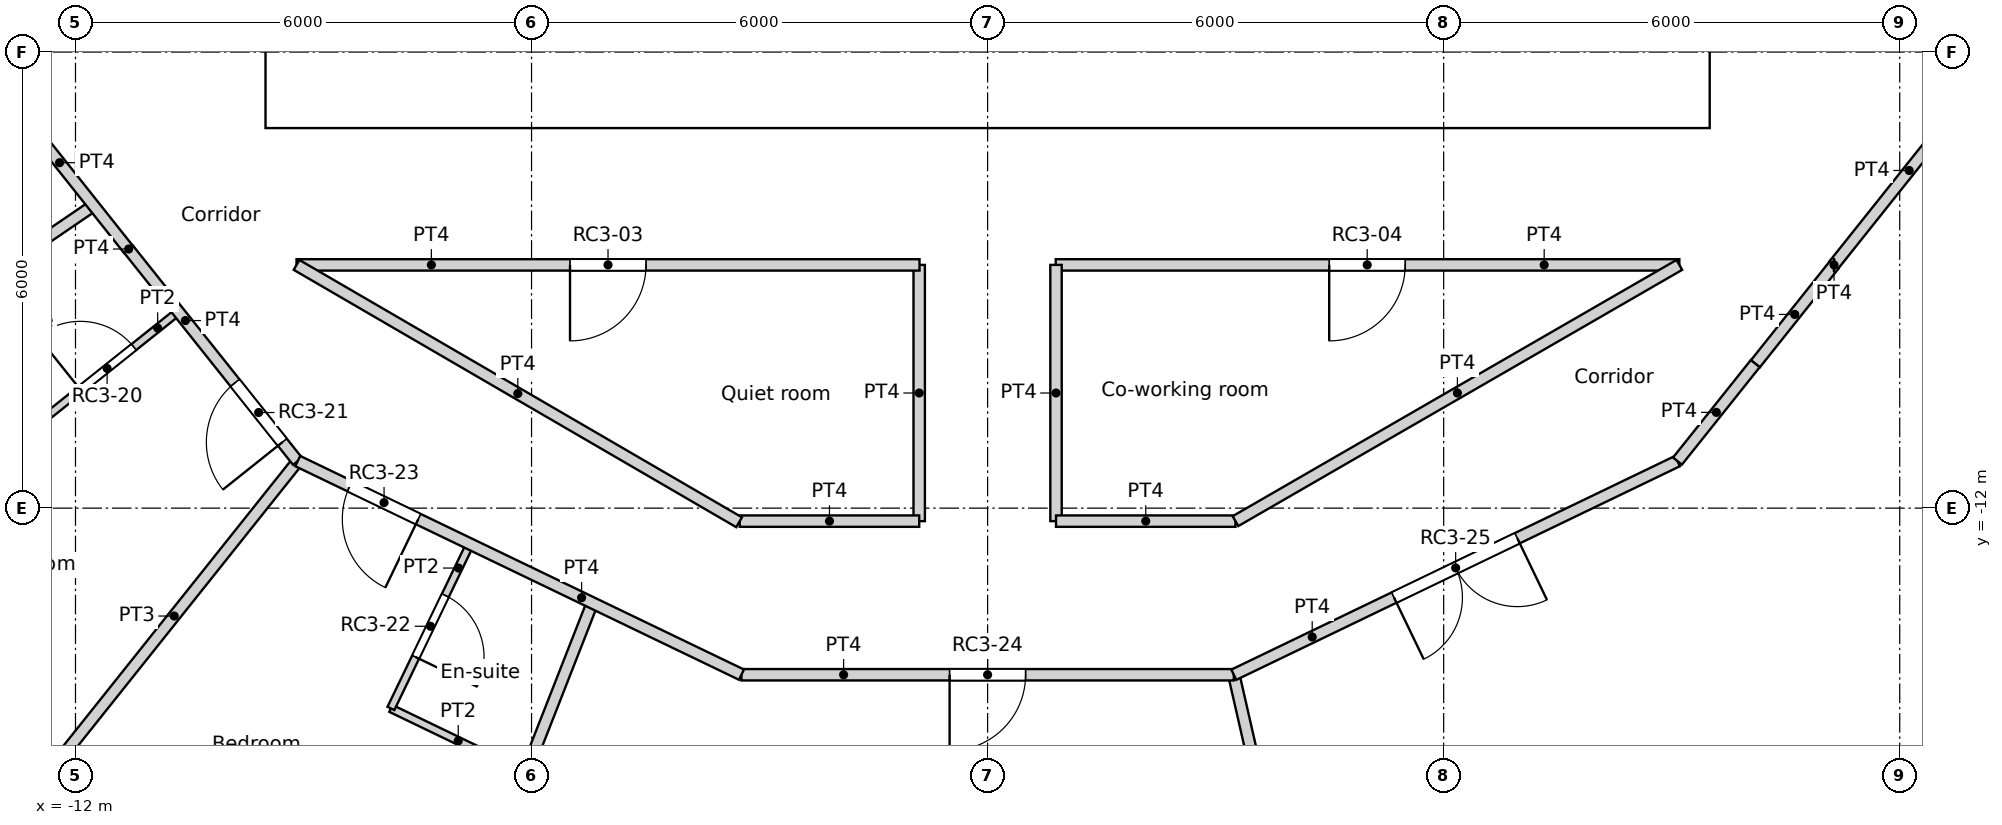
"""IFC4 building model, lengths in metres.
Left out: names, types, materials, properties, quantities, classifications, styles, units other than length and angle.
Written with IfcOpenShell. Run it as: python <this file> out.ifc"""

import sys

from ifc_helpers import new_model, si_unit, direction, frame, frame_2d, origin, origin_2d, place, context, subcontext, project, spatial, rectangle, circle, extrude, element, fill, save


model = new_model("IFC4")
c1 = context("Model", 3, precision=1e-05, world=origin(), true_north=direction((0.0, 1.0)))
c2 = subcontext(c1, "Body", "Model", "MODEL_VIEW")
j1 = project(units=[si_unit("LENGTHUNIT", "METRE"), si_unit("PLANEANGLEUNIT", "RADIAN")], contexts=[c1])
p1 = place(None, origin())
s1 = spatial("IfcSite", under=j1, at=p1, CompositionType="ELEMENT")
p2 = place(p1, origin())
s2 = spatial("IfcBuilding", under=s1, at=p2, CompositionType="ELEMENT")
p3 = place(p2, frame((0.0, 0.0, 252.6)))
s3 = spatial("IfcBuildingStorey", under=s2, at=p3, CompositionType="ELEMENT", Elevation=252.6)
p4 = place(p3, frame((11.735, -14.716, 0.0), z_axis=(0.0, 0.0, 1.0), x_axis=(1.0, 0.0, 0.0)))
e1 = element("IfcColumn", 1, at=p4, inside=s3, PredefinedType="COLUMN", context=c2, shape_type="SweptSolid", body=[
    extrude(circle(Radius=0.55, at=origin_2d()), origin(), (0.0, 0.0, 1.0), 3.6),
])
p5 = place(p3, frame((-9.5, -6.7, 0.0), z_axis=(0.0, 0.0, 1.0), x_axis=(1.0, 0.0, 0.0)))
e2 = element("IfcWall", 2, at=p5, inside=s3, PredefinedType="SOLIDWALL", context=c2, shape_type="SweptSolid", body=[
    extrude(rectangle(XDim=19.0, YDim=0.6, at=frame_2d((9.5, 0.0))), origin(), (0.0, 0.0, 1.0), 3.6),
])
p6 = place(p5, frame((10.4, 0.0, 0.0)))
e3 = element("IfcOpeningElement", 3, at=p6, cuts=e2, PredefinedType="OPENING", context=c2, shape_type="SweptSolid", body=[
    extrude(rectangle(XDim=1.0, YDim=2.1, at=frame_2d((0.5, 1.05))), frame((0.0, 0.3, 0.0), z_axis=(0.0, -1.0, 0.0), x_axis=(1.0, 0.0, 0.0)), (0.0, 0.0, 1.0), 0.6),
])
p7 = place(p5, frame((5.35, 0.0, 0.0)))
e4 = element("IfcOpeningElement", 4, at=p7, cuts=e2, PredefinedType="OPENING", context=c2, shape_type="SweptSolid", body=[
    extrude(rectangle(XDim=1.7, YDim=2.1, at=frame_2d((0.85, 1.05))), frame((0.0, 0.3, 0.0), z_axis=(0.0, -1.0, 0.0), x_axis=(1.0, 0.0, 0.0)), (0.0, 0.0, 1.0), 0.6),
])
p8 = place(p5, frame((11.95, 0.0, 0.0)))
e5 = element("IfcOpeningElement", 5, at=p8, cuts=e2, PredefinedType="OPENING", context=c2, shape_type="SweptSolid", body=[
    extrude(rectangle(XDim=1.7, YDim=2.1, at=frame_2d((0.85, 1.05))), frame((0.0, 0.3, 0.0), z_axis=(0.0, -1.0, 0.0), x_axis=(1.0, 0.0, 0.0)), (0.0, 0.0, 1.0), 0.6),
])
p9 = place(p3, frame((-9.2, -6.4, 0.0), z_axis=(0.0, 0.0, 1.0), x_axis=(0.0, 1.0, 0.0)))
e6 = element("IfcWall", 6, at=p9, inside=s3, PredefinedType="SOLIDWALL", context=c2, shape_type="SweptSolid", body=[
    extrude(rectangle(XDim=12.8, YDim=0.6, at=frame_2d((6.4, 0.0))), origin(), (0.0, 0.0, 1.0), 3.6),
])
p10 = place(p3, frame((9.2, -6.4, 0.0), z_axis=(0.0, 0.0, 1.0), x_axis=(0.0, 1.0, 0.0)))
e7 = element("IfcWall", 7, at=p10, inside=s3, PredefinedType="SOLIDWALL", context=c2, shape_type="SweptSolid", body=[
    extrude(rectangle(XDim=12.8, YDim=0.6, at=frame_2d((6.4, 0.0))), origin(), (0.0, 0.0, 1.0), 3.6),
])
p11 = place(p10, frame((6.4, 0.0, 0.0)))
e8 = element("IfcOpeningElement", 8, at=p11, cuts=e7, PredefinedType="OPENING", context=c2, shape_type="SweptSolid", body=[
    extrude(rectangle(XDim=1.8, YDim=2.1, at=frame_2d((0.9, 1.05))), frame((0.0, 0.3, 0.0), z_axis=(0.0, -1.0, 0.0), x_axis=(1.0, 0.0, 0.0)), (0.0, 0.0, 1.0), 0.6),
])
for number, where, z_axis, x_axis in (
    (9, (-2.25, -6.4, 0.0), (0.0, 0.0, 1.0), (0.0, 1.0, 0.0)),
    (10, (0.55, -6.4, 0.0), (0.0, 0.0, 1.0), (0.0, 1.0, 0.0)),
    (11, (2.25, -6.4, 0.0), (0.0, 0.0, 1.0), (0.0, 1.0, 0.0)),
):
    element("IfcWall", number, at=place(p3, frame(where, z_axis=z_axis, x_axis=x_axis)), inside=s3, PredefinedType="SOLIDWALL", context=c2, shape_type="SweptSolid", body=[
        extrude(rectangle(XDim=3.15, YDim=0.3, at=frame_2d((1.575, 0.0))), origin(), (0.0, 0.0, 1.0), 3.25),
    ])
p12 = place(p3, frame((-9.092, -8.8, 0.0), z_axis=(0.0, 0.0, 1.0), x_axis=(1.0, 0.0, 0.0)))
e12 = element("IfcWall", 12, at=p12, inside=s3, PredefinedType="PARTITIONING", context=c2, shape_type="SweptSolid", body=[
    extrude(rectangle(XDim=8.196, YDim=0.15, at=frame_2d((4.098, 0.0))), origin(), (0.0, 0.0, 1.0), 3.25),
])
p13 = place(p12, frame((3.598, 0.0, 0.0)))
e13 = element("IfcOpeningElement", 13, at=p13, cuts=e12, PredefinedType="OPENING", context=c2, shape_type="SweptSolid", body=[
    extrude(rectangle(XDim=1.0, YDim=2.04, at=frame_2d((0.5, 1.02))), frame((0.0, 0.075, 0.0), z_axis=(0.0, -1.0, 0.0), x_axis=(1.0, 0.0, 0.0)), (0.0, 0.0, 1.0), 0.15),
])
p14 = place(p3, frame((-9.092, -8.8, 0.0), z_axis=(0.0, 0.0, 1.0), x_axis=(0.864470922103, -0.502682827277, 0.0)))
e14 = element("IfcWall", 14, at=p14, inside=s3, PredefinedType="PARTITIONING", context=c2, shape_type="SweptSolid", body=[
    extrude(rectangle(XDim=6.735, YDim=0.15, at=frame_2d((3.368, 0.0))), origin(), (0.0, 0.0, 1.0), 3.25),
])
p15 = place(p3, frame((0.896, -8.8, 0.0), z_axis=(0.0, 0.0, 1.0), x_axis=(1.0, 0.0, 0.0)))
e15 = element("IfcWall", 15, at=p15, inside=s3, PredefinedType="PARTITIONING", context=c2, shape_type="SweptSolid", body=[
    extrude(rectangle(XDim=8.205, YDim=0.15, at=frame_2d((4.102, 0.0))), origin(), (0.0, 0.0, 1.0), 3.25),
])
p16 = place(p15, frame((3.598, 0.0, 0.0)))
e16 = element("IfcOpeningElement", 16, at=p16, cuts=e15, PredefinedType="OPENING", context=c2, shape_type="SweptSolid", body=[
    extrude(rectangle(XDim=1.0, YDim=2.04, at=frame_2d((0.5, 1.02))), frame((0.0, 0.075, 0.0), z_axis=(0.0, -1.0, 0.0), x_axis=(1.0, 0.0, 0.0)), (0.0, 0.0, 1.0), 0.15),
])
p17 = place(p3, frame((-11.3, -8.596, 0.0), z_axis=(0.0, 0.0, 1.0), x_axis=(0.623165080354, -0.782090328944, 0.0)))
e17 = element("IfcWall", 17, at=p17, inside=s3, PredefinedType="PARTITIONING", context=c2, shape_type="SweptSolid", body=[
    extrude(rectangle(XDim=3.564, YDim=0.15, at=frame_2d((1.782, 0.0))), origin(), (0.0, 0.0, 1.0), 3.25),
])
p18 = place(p17, frame((2.244, 0.0, 0.0)))
e18 = element("IfcOpeningElement", 18, at=p18, cuts=e17, PredefinedType="OPENING", context=c2, shape_type="SweptSolid", body=[
    extrude(rectangle(XDim=1.0, YDim=2.1, at=frame_2d((0.5, 1.05))), frame((0.0, 0.075, 0.0), z_axis=(0.0, -1.0, 0.0), x_axis=(1.0, 0.0, 0.0)), (0.0, 0.0, 1.0), 0.15),
])
p19 = place(p3, frame((-11.3, -8.596, 0.0), z_axis=(0.0, 0.0, 1.0), x_axis=(0.0, 1.0, 0.0)))
e19 = element("IfcWall", 19, at=p19, inside=s3, PredefinedType="PARTITIONING", context=c2, shape_type="SweptSolid", body=[
    extrude(rectangle(XDim=0.01, YDim=0.15, at=frame_2d((0.005, 0.0))), origin(), (0.0, 0.0, 1.0), 3.25),
])
p20 = place(p3, frame((11.137, -8.8, 0.0), z_axis=(0.0, 0.0, 1.0), x_axis=(-1.0, 0.0, 0.0)))
e20 = element("IfcWall", 20, at=p20, inside=s3, PredefinedType="PARTITIONING", context=c2, shape_type="SweptSolid", body=[
    extrude(rectangle(XDim=0.003, YDim=0.15, at=frame_2d((0.001, 0.0))), origin(), (0.0, 0.0, 1.0), 3.25),
])
p21 = place(p3, frame((10.101, -10.101, 0.0), z_axis=(0.0, 0.0, 1.0), x_axis=(0.623098344652, 0.782143498913, 0.0)))
e21 = element("IfcWall", 21, at=p21, inside=s3, PredefinedType="PARTITIONING", context=c2, shape_type="SweptSolid", body=[
    extrude(rectangle(XDim=1.661, YDim=0.15, at=frame_2d((0.831, 0.0))), origin(), (0.0, 0.0, 1.0), 3.25),
])
p22 = place(p3, frame((11.134, -8.8, 0.0), z_axis=(0.0, 0.0, 1.0), x_axis=(0.623476099415, 0.781842409606, 0.0)))
e22 = element("IfcWall", 22, at=p22, inside=s3, PredefinedType="PARTITIONING", context=c2, shape_type="SweptSolid", body=[
    extrude(rectangle(XDim=3.177, YDim=0.15, at=frame_2d((1.589, 0.0))), origin(), (0.0, 0.0, 1.0), 3.25),
])
p23 = place(p3, frame((-13.115, -6.316, 0.0), z_axis=(0.0, 0.0, 1.0), x_axis=(0.622042479172, -0.782983495423, 0.0)))
e23 = element("IfcWall", 23, at=p23, inside=s3, PredefinedType="PARTITIONING", context=c2, shape_type="SweptSolid", body=[
    extrude(rectangle(XDim=2.911, YDim=0.15, at=frame_2d((1.456, 0.0))), origin(), (0.0, 0.0, 1.0), 3.25),
])
p24 = place(p3, frame((-3.261, -12.171, 0.0), z_axis=(0.0, 0.0, 1.0), x_axis=(1.0, 0.0, 0.0)))
e24 = element("IfcWall", 24, at=p24, inside=s3, PredefinedType="PARTITIONING", context=c2, shape_type="SweptSolid", body=[
    extrude(rectangle(XDim=2.361, YDim=0.15, at=frame_2d((1.181, 0.0))), origin(), (0.0, 0.0, 1.0), 3.25),
])
for number, where, z_axis, x_axis in (
    (25, (-0.9, -12.171, 0.0), (0.0, 0.0, 1.0), (0.0, 1.0, 0.0)),
    (26, (0.9, -12.171, 0.0), (0.0, 0.0, 1.0), (0.0, 1.0, 0.0)),
):
    element("IfcWall", number, at=place(p3, frame(where, z_axis=z_axis, x_axis=x_axis)), inside=s3, PredefinedType="PARTITIONING", context=c2, shape_type="SweptSolid", body=[
        extrude(rectangle(XDim=3.371, YDim=0.15, at=frame_2d((1.686, 0.0))), origin(), (0.0, 0.0, 1.0), 3.25),
    ])
p25 = place(p3, frame((0.9, -12.171, 0.0), z_axis=(0.0, 0.0, 1.0), x_axis=(1.0, 0.0, 0.0)))
e27 = element("IfcWall", 27, at=p25, inside=s3, PredefinedType="PARTITIONING", context=c2, shape_type="SweptSolid", body=[
    extrude(rectangle(XDim=2.361, YDim=0.15, at=frame_2d((1.181, 0.0))), origin(), (0.0, 0.0, 1.0), 3.25),
])
p26 = place(p3, frame((3.261, -12.171, 0.0), z_axis=(0.0, 0.0, 1.0), x_axis=(0.866066809554, 0.499928276245, 0.0)))
e28 = element("IfcWall", 28, at=p26, inside=s3, PredefinedType="PARTITIONING", context=c2, shape_type="SweptSolid", body=[
    extrude(rectangle(XDim=6.743, YDim=0.15, at=frame_2d((3.371, 0.0))), origin(), (0.0, 0.0, 1.0), 3.25),
])
p27 = place(p3, frame((-9.076, -11.381, 0.0), z_axis=(0.0, 0.0, 1.0), x_axis=(0.901070942113, -0.433671716024, 0.0)))
e29 = element("IfcWall", 29, at=p27, inside=s3, PredefinedType="PARTITIONING", context=c2, shape_type="SweptSolid", body=[
    extrude(rectangle(XDim=6.479, YDim=0.15, at=frame_2d((3.239, 0.0))), origin(), (0.0, 0.0, 1.0), 3.25),
])
p28 = place(p27, frame((0.76, 0.0, 0.0)))
e30 = element("IfcOpeningElement", 30, at=p28, cuts=e29, PredefinedType="OPENING", context=c2, shape_type="SweptSolid", body=[
    extrude(rectangle(XDim=1.0, YDim=2.1, at=frame_2d((0.5, 1.05))), frame((0.0, 0.075, 0.0), z_axis=(0.0, -1.0, 0.0), x_axis=(1.0, 0.0, 0.0)), (0.0, 0.0, 1.0), 0.15),
])
p29 = place(p3, frame((-3.239, -14.192, 0.0), z_axis=(0.0, 0.0, 1.0), x_axis=(1.0, 0.0, 0.0)))
e31 = element("IfcWall", 31, at=p29, inside=s3, PredefinedType="PARTITIONING", context=c2, shape_type="SweptSolid", body=[
    extrude(rectangle(XDim=6.478, YDim=0.15, at=frame_2d((3.239, 0.0))), origin(), (0.0, 0.0, 1.0), 3.25),
])
p30 = place(p29, frame((2.739, 0.0, 0.0)))
e32 = element("IfcOpeningElement", 32, at=p30, cuts=e31, PredefinedType="OPENING", context=c2, shape_type="SweptSolid", body=[
    extrude(rectangle(XDim=1.0, YDim=2.04, at=frame_2d((0.5, 1.02))), frame((0.0, 0.075, 0.0), z_axis=(0.0, -1.0, 0.0), x_axis=(1.0, 0.0, 0.0)), (0.0, 0.0, 1.0), 0.15),
])
p31 = place(p3, frame((9.076, -11.381, 0.0), z_axis=(0.0, 0.0, 1.0), x_axis=(0.623805208652, 0.781579849829, 0.0)))
e33 = element("IfcWall", 33, at=p31, inside=s3, PredefinedType="PARTITIONING", context=c2, shape_type="SweptSolid", body=[
    extrude(rectangle(XDim=1.64, YDim=0.15, at=frame_2d((0.82, 0.0))), origin(), (0.0, 0.0, 1.0), 3.25),
])
p32 = place(p3, frame((3.239, -14.192, 0.0), z_axis=(0.0, 0.0, 1.0), x_axis=(0.900976027191, 0.433868872388, 0.0)))
e34 = element("IfcWall", 34, at=p32, inside=s3, PredefinedType="PARTITIONING", context=c2, shape_type="SweptSolid", body=[
    extrude(rectangle(XDim=6.479, YDim=0.15, at=frame_2d((3.239, 0.0))), origin(), (0.0, 0.0, 1.0), 3.25),
])
p33 = place(p32, frame((2.34, 0.0, 0.0)))
e35 = element("IfcOpeningElement", 35, at=p33, cuts=e34, PredefinedType="OPENING", context=c2, shape_type="SweptSolid", body=[
    extrude(rectangle(XDim=1.8, YDim=2.1, at=frame_2d((0.9, 1.05))), frame((0.0, 0.075, 0.0), z_axis=(0.0, -1.0, 0.0), x_axis=(1.0, 0.0, 0.0)), (0.0, 0.0, 1.0), 0.15),
])
p34 = place(p3, frame((-13.75, -9.375, 0.0), z_axis=(0.0, 0.0, 1.0), x_axis=(0.826143746222, 0.563459413426, 0.0)))
e36 = element("IfcWall", 36, at=p34, inside=s3, PredefinedType="PARTITIONING", context=c2, shape_type="SweptSolid", body=[
    extrude(rectangle(XDim=2.41, YDim=0.15, at=frame_2d((1.205, 0.0))), origin(), (0.0, 0.0, 1.0), 3.25),
])
p35 = place(p3, frame((-12.522, -10.91, 0.0), z_axis=(0.0, 0.0, 1.0), x_axis=(0.781830263661, 0.623491330191, 0.0)))
e37 = element("IfcWall", 37, at=p35, inside=s3, PredefinedType="PARTITIONING", context=c2, shape_type="SweptSolid", body=[
    extrude(rectangle(XDim=2.401, YDim=0.1, at=frame_2d((1.2, 0.0))), origin(), (0.0, 0.0, 1.0), 3.25),
])
p36 = place(p35, frame((0.75, 0.0, 0.0)))
e38 = element("IfcOpeningElement", 38, at=p36, cuts=e37, PredefinedType="OPENING", context=c2, shape_type="SweptSolid", body=[
    extrude(rectangle(XDim=0.9, YDim=2.04, at=frame_2d((0.45, 1.02))), frame((0.0, 0.05, 0.0), z_axis=(0.0, -1.0, 0.0), x_axis=(1.0, 0.0, 0.0)), (0.0, 0.0, 1.0), 0.1),
])
p37 = place(p3, frame((-12.327, -15.458, 0.0), z_axis=(0.0, 0.0, 1.0), x_axis=(0.623460949534, 0.781854490558, 0.0)))
e39 = element("IfcWall", 39, at=p37, inside=s3, PredefinedType="PARTITIONING", context=c2, shape_type="SweptSolid", body=[
    extrude(rectangle(XDim=5.214, YDim=0.15, at=frame_2d((2.607, 0.0))), origin(), (0.0, 0.0, 1.0), 3.25),
])
p38 = place(p3, frame((-7.85, -14.635, 0.0), z_axis=(0.0, 0.0, 1.0), x_axis=(0.433815618773, 0.901001669759, 0.0)))
e40 = element("IfcWall", 40, at=p38, inside=s3, PredefinedType="PARTITIONING", context=c2, shape_type="SweptSolid", body=[
    extrude(rectangle(XDim=2.4, YDim=0.1, at=frame_2d((1.2, 0.0))), origin(), (0.0, 0.0, 1.0), 3.25),
])
p39 = place(p38, frame((0.75, 0.0, 0.0)))
e41 = element("IfcOpeningElement", 41, at=p39, cuts=e40, PredefinedType="OPENING", context=c2, shape_type="SweptSolid", body=[
    extrude(rectangle(XDim=0.9, YDim=2.04, at=frame_2d((0.45, 1.02))), frame((0.0, 0.05, 0.0), z_axis=(0.0, -1.0, 0.0), x_axis=(1.0, 0.0, 0.0)), (0.0, 0.0, 1.0), 0.1),
])
p40 = place(p3, frame((-7.85, -14.635, 0.0), z_axis=(0.0, 0.0, 1.0), x_axis=(0.900936932599, -0.433950047216, 0.0)))
e42 = element("IfcWall", 42, at=p40, inside=s3, PredefinedType="PARTITIONING", context=c2, shape_type="SweptSolid", body=[
    extrude(rectangle(XDim=1.966, YDim=0.1, at=frame_2d((0.983, 0.0))), origin(), (0.0, 0.0, 1.0), 3.25),
])
p41 = place(p3, frame((-7.223, -18.405, 0.0), z_axis=(0.0, 0.0, 1.0), x_axis=(0.36511374114, 0.930962918719, 0.0)))
e43 = element("IfcWall", 43, at=p41, inside=s3, PredefinedType="PARTITIONING", context=c2, shape_type="SweptSolid", body=[
    extrude(rectangle(XDim=5.54, YDim=0.15, at=frame_2d((2.77, 0.0))), origin(), (0.0, 0.0, 1.0), 3.25),
])
p42 = place(p3, frame((3.239, -14.192, 0.0), z_axis=(0.0, 0.0, 1.0), x_axis=(0.222612505682, -0.974907007008, 0.0)))
e44 = element("IfcWall", 44, at=p42, inside=s3, PredefinedType="PARTITIONING", context=c2, shape_type="SweptSolid", body=[
    extrude(rectangle(XDim=5.215, YDim=0.15, at=frame_2d((2.607, 0.0))), origin(), (0.0, 0.0, 1.0), 3.25),
])
p43 = place(p6, origin())
e45 = element("IfcDoor", 45, at=p43, inside=s3, OperationType="SINGLE_SWING_LEFT", PredefinedType="DOOR", context=c2, shape_type="SweptSolid", body=[
    extrude(rectangle(XDim=1.0, YDim=2.1, at=frame_2d((0.5, 1.05))), frame((0.0, 0.025, 0.0), z_axis=(0.0, -1.0, 0.0), x_axis=(1.0, 0.0, 0.0)), (0.0, 0.0, 1.0), 0.05),
])
fill(e3, e45)
p44 = place(p7, origin())
e46 = element("IfcDoor", 46, at=p44, inside=s3, OperationType="DOUBLE_DOOR_SINGLE_SWING", PredefinedType="DOOR", context=c2, shape_type="SweptSolid", body=[
    extrude(rectangle(XDim=1.7, YDim=2.1, at=frame_2d((0.85, 1.05))), frame((0.0, 0.025, 0.0), z_axis=(0.0, -1.0, 0.0), x_axis=(1.0, 0.0, 0.0)), (0.0, 0.0, 1.0), 0.05),
])
fill(e4, e46)
p45 = place(p8, origin())
e47 = element("IfcDoor", 47, at=p45, inside=s3, OperationType="DOUBLE_DOOR_SINGLE_SWING", PredefinedType="DOOR", context=c2, shape_type="SweptSolid", body=[
    extrude(rectangle(XDim=1.7, YDim=2.1, at=frame_2d((0.85, 1.05))), frame((0.0, 0.025, 0.0), z_axis=(0.0, -1.0, 0.0), x_axis=(1.0, 0.0, 0.0)), (0.0, 0.0, 1.0), 0.05),
])
fill(e5, e47)
p46 = place(p13, origin())
e48 = element("IfcDoor", 48, at=p46, inside=s3, OperationType="SINGLE_SWING_RIGHT", PredefinedType="DOOR", context=c2, shape_type="SweptSolid", body=[
    extrude(rectangle(XDim=1.0, YDim=2.04, at=frame_2d((0.5, 1.02))), frame((0.0, 0.025, 0.0), z_axis=(0.0, -1.0, 0.0), x_axis=(1.0, 0.0, 0.0)), (0.0, 0.0, 1.0), 0.05),
])
fill(e13, e48)
p47 = place(p16, origin())
e49 = element("IfcDoor", 49, at=p47, inside=s3, OperationType="SINGLE_SWING_RIGHT", PredefinedType="DOOR", context=c2, shape_type="SweptSolid", body=[
    extrude(rectangle(XDim=1.0, YDim=2.04, at=frame_2d((0.5, 1.02))), frame((0.0, 0.025, 0.0), z_axis=(0.0, -1.0, 0.0), x_axis=(1.0, 0.0, 0.0)), (0.0, 0.0, 1.0), 0.05),
])
fill(e16, e49)
p48 = place(p36, origin())
e50 = element("IfcDoor", 50, at=p48, inside=s3, OperationType="SINGLE_SWING_LEFT", PredefinedType="DOOR", context=c2, shape_type="SweptSolid", body=[
    extrude(rectangle(XDim=0.9, YDim=2.04, at=frame_2d((0.45, 1.02))), frame((0.0, 0.025, 0.0), z_axis=(0.0, -1.0, 0.0), x_axis=(1.0, 0.0, 0.0)), (0.0, 0.0, 1.0), 0.05),
])
fill(e38, e50)
p49 = place(p18, origin())
e51 = element("IfcDoor", 51, at=p49, inside=s3, OperationType="SINGLE_SWING_LEFT", PredefinedType="DOOR", context=c2, shape_type="SweptSolid", body=[
    extrude(rectangle(XDim=1.0, YDim=2.1, at=frame_2d((0.5, 1.05))), frame((0.0, 0.025, 0.0), z_axis=(0.0, -1.0, 0.0), x_axis=(1.0, 0.0, 0.0)), (0.0, 0.0, 1.0), 0.05),
])
fill(e18, e51)
p50 = place(p39, origin())
e52 = element("IfcDoor", 52, at=p50, inside=s3, OperationType="SINGLE_SWING_RIGHT", PredefinedType="DOOR", context=c2, shape_type="SweptSolid", body=[
    extrude(rectangle(XDim=0.9, YDim=2.04, at=frame_2d((0.45, 1.02))), frame((0.0, 0.025, 0.0), z_axis=(0.0, -1.0, 0.0), x_axis=(1.0, 0.0, 0.0)), (0.0, 0.0, 1.0), 0.05),
])
fill(e41, e52)
p51 = place(p28, origin())
e53 = element("IfcDoor", 53, at=p51, inside=s3, OperationType="SINGLE_SWING_LEFT", PredefinedType="DOOR", context=c2, shape_type="SweptSolid", body=[
    extrude(rectangle(XDim=1.0, YDim=2.1, at=frame_2d((0.5, 1.05))), frame((0.0, 0.025, 0.0), z_axis=(0.0, -1.0, 0.0), x_axis=(1.0, 0.0, 0.0)), (0.0, 0.0, 1.0), 0.05),
])
fill(e30, e53)
p52 = place(p30, origin())
e54 = element("IfcDoor", 54, at=p52, inside=s3, OperationType="SINGLE_SWING_RIGHT", PredefinedType="DOOR", context=c2, shape_type="SweptSolid", body=[
    extrude(rectangle(XDim=1.0, YDim=2.04, at=frame_2d((0.5, 1.02))), frame((0.0, 0.025, 0.0), z_axis=(0.0, -1.0, 0.0), x_axis=(1.0, 0.0, 0.0)), (0.0, 0.0, 1.0), 0.05),
])
fill(e32, e54)
p53 = place(p33, origin())
e55 = element("IfcDoor", 55, at=p53, inside=s3, OperationType="DOUBLE_DOOR_SINGLE_SWING", PredefinedType="DOOR", context=c2, shape_type="SweptSolid", body=[
    extrude(rectangle(XDim=1.8, YDim=2.1, at=frame_2d((0.9, 1.05))), frame((0.0, 0.025, 0.0), z_axis=(0.0, -1.0, 0.0), x_axis=(1.0, 0.0, 0.0)), (0.0, 0.0, 1.0), 0.05),
])
fill(e35, e55)
save(model, sys.argv[1])
